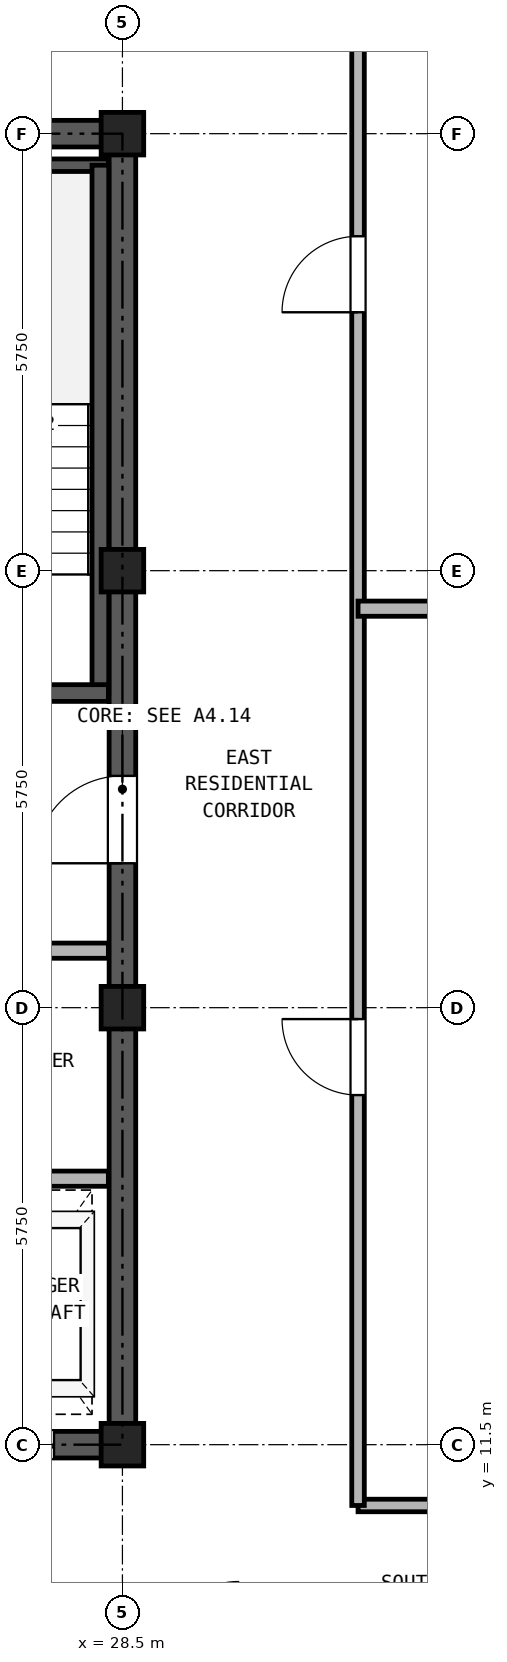
"""IFC4 building model, lengths in metres.
Left out: names, types, materials, properties, quantities, classifications, styles, units other than length and angle.
Written with IfcOpenShell. Run it as: python <this file> out.ifc"""

import sys

from ifc_helpers import new_model, si_unit, direction, frame, frame_2d, origin, origin_2d, place, context, subcontext, project, spatial, rectangle, hollow_rectangle, extrude, source, transform, mapped, element, fill, save


model = new_model("IFC4")
c1 = context("Model", 3, precision=1e-05, world=origin(), true_north=direction((0.0, 1.0)))
c2 = subcontext(c1, "Body", "Model", "MODEL_VIEW")
j1 = project(units=[si_unit("LENGTHUNIT", "METRE"), si_unit("PLANEANGLEUNIT", "RADIAN")], contexts=[c1])
p1 = place(None, origin())
s1 = spatial("IfcSite", under=j1, at=p1, CompositionType="ELEMENT")
p2 = place(p1, origin())
s2 = spatial("IfcBuilding", under=s1, at=p2, CompositionType="ELEMENT")
p3 = place(p2, frame((0.0, 0.0, 239.3)))
s3 = spatial("IfcBuildingStorey", under=s2, at=p3, CompositionType="ELEMENT", Elevation=239.3)
m1 = source(origin(), c2, "Body", "SweptSolid", [
    extrude(hollow_rectangle(XDim=0.56, YDim=0.56, WallThickness=0.03, at=origin_2d()), origin(), (0.0, 0.0, 1.0), 2.98),
])
for number, where, z_axis, x_axis in (
    (1, (28.5, 11.5, 0.0), (0.0, 0.0, 1.0), (1.0, 0.0, 0.0)),
    (2, (28.5, 17.25, 0.0), (0.0, 0.0, 1.0), (1.0, 0.0, 0.0)),
    (3, (28.5, 23.0, 0.0), (0.0, 0.0, 1.0), (1.0, 0.0, 0.0)),
    (4, (28.5, 28.75, 0.0), (0.0, 0.0, 1.0), (1.0, 0.0, 0.0)),
):
    element("IfcColumn", number, at=place(p3, frame(where, z_axis=z_axis, x_axis=x_axis)), inside=s3, PredefinedType="COLUMN", context=c2, shape_type="MappedRepresentation", body=[
        mapped(m1, transform((0.0, 0.0, 0.0), x_axis=(1.0, 0.0, 0.0), y_axis=(0.0, 1.0, 0.0), z_axis=(0.0, 0.0, 1.0), scale=1.0)),
    ])
p4 = place(p3, frame((18.325, 11.5, 0.0), z_axis=(0.0, 0.0, 1.0), x_axis=(1.0, 0.0, 0.0)))
e5 = element("IfcWall", 5, at=p4, inside=s3, PredefinedType="SHEAR", context=c2, shape_type="SweptSolid", body=[
    extrude(rectangle(XDim=10.35, YDim=0.35, at=frame_2d((5.175, 0.0))), origin(), (0.0, 0.0, 1.0), 2.98),
])
p5 = place(p4, frame((1.775, 0.0, 0.0)))
e6 = element("IfcOpeningElement", 6, at=p5, cuts=e5, PredefinedType="OPENING", context=c2, shape_type="SweptSolid", body=[
    extrude(rectangle(XDim=0.95, YDim=2.15, at=frame_2d((0.475, 1.075))), frame((0.0, 0.185, 0.0), z_axis=(0.0, -1.0, 0.0), x_axis=(1.0, 0.0, 0.0)), (0.0, 0.0, 1.0), 0.37),
])
p6 = place(p4, frame((5.275, 0.0, 0.0)))
e7 = element("IfcOpeningElement", 7, at=p6, cuts=e5, PredefinedType="OPENING", context=c2, shape_type="SweptSolid", body=[
    extrude(rectangle(XDim=0.95, YDim=2.15, at=frame_2d((0.475, 1.075))), frame((0.0, 0.185, 0.0), z_axis=(0.0, -1.0, 0.0), x_axis=(1.0, 0.0, 0.0)), (0.0, 0.0, 1.0), 0.37),
])
p7 = place(p4, frame((8.175, 0.0, 0.0)))
e8 = element("IfcOpeningElement", 8, at=p7, cuts=e5, PredefinedType="OPENING", context=c2, shape_type="SweptSolid", body=[
    extrude(rectangle(XDim=1.1, YDim=2.25, at=frame_2d((0.55, 1.125))), frame((0.0, 0.185, 0.0), z_axis=(0.0, -1.0, 0.0), x_axis=(1.0, 0.0, 0.0)), (0.0, 0.0, 1.0), 0.37),
])
p8 = place(p3, frame((18.325, 28.75, 0.0), z_axis=(0.0, 0.0, 1.0), x_axis=(1.0, 0.0, 0.0)))
e9 = element("IfcWall", 9, at=p8, inside=s3, PredefinedType="SHEAR", context=c2, shape_type="SweptSolid", body=[
    extrude(rectangle(XDim=10.35, YDim=0.35, at=frame_2d((5.175, 0.0))), origin(), (0.0, 0.0, 1.0), 2.98),
])
p9 = place(p8, frame((4.055, 0.0, 0.0)))
e10 = element("IfcOpeningElement", 10, at=p9, cuts=e9, PredefinedType="OPENING", context=c2, shape_type="SweptSolid", body=[
    extrude(rectangle(XDim=0.9, YDim=2.05, at=frame_2d((0.45, 1.025))), frame((0.0, 0.185, 0.0), z_axis=(0.0, -1.0, 0.0), x_axis=(1.0, 0.0, 0.0)), (0.0, 0.0, 1.0), 0.37),
])
p10 = place(p8, frame((5.595, 0.0, 0.0)))
e11 = element("IfcOpeningElement", 11, at=p10, cuts=e9, PredefinedType="OPENING", context=c2, shape_type="SweptSolid", body=[
    extrude(rectangle(XDim=0.9, YDim=2.05, at=frame_2d((0.45, 1.025))), frame((0.0, 0.185, 0.0), z_axis=(0.0, -1.0, 0.0), x_axis=(1.0, 0.0, 0.0)), (0.0, 0.0, 1.0), 0.37),
])
p11 = place(p3, frame((28.5, 11.675, 0.0), z_axis=(0.0, 0.0, 1.0), x_axis=(0.0, 1.0, 0.0)))
e12 = element("IfcWall", 12, at=p11, inside=s3, PredefinedType="SHEAR", context=c2, shape_type="SweptSolid", body=[
    extrude(rectangle(XDim=16.9, YDim=0.35, at=frame_2d((8.45, 0.0))), origin(), (0.0, 0.0, 1.0), 2.98),
])
p12 = place(p11, frame((7.475, 0.0, 0.0)))
e13 = element("IfcOpeningElement", 13, at=p12, cuts=e12, PredefinedType="OPENING", context=c2, shape_type="SweptSolid", body=[
    extrude(rectangle(XDim=1.15, YDim=2.2, at=frame_2d((0.575, 1.1))), frame((0.0, 0.185, 0.0), z_axis=(0.0, -1.0, 0.0), x_axis=(1.0, 0.0, 0.0)), (0.0, 0.0, 1.0), 0.37),
])
p13 = place(p3, frame((25.13, 28.335, 0.0), z_axis=(0.0, 0.0, 1.0), x_axis=(1.0, 0.0, 0.0)))
e14 = element("IfcWall", 14, at=p13, inside=s3, PredefinedType="PARTITIONING", context=c2, shape_type="SweptSolid", body=[
    extrude(rectangle(XDim=3.185, YDim=0.165, at=frame_2d((1.593, 0.0))), origin(), (0.0, 0.0, 1.0), 2.98),
])
p14 = place(p3, frame((28.21, 21.39, 0.0), z_axis=(0.0, 0.0, 1.0), x_axis=(0.0, 1.0, 0.0)))
e15 = element("IfcWall", 15, at=p14, inside=s3, PredefinedType="SOLIDWALL", context=c2, shape_type="SweptSolid", body=[
    extrude(rectangle(XDim=6.945, YDim=0.22, at=frame_2d((3.473, 0.0))), origin(), (0.0, 0.0, 1.0), 2.98),
])
p15 = place(p3, frame((25.13, 21.39, 0.0), z_axis=(0.0, 0.0, 1.0), x_axis=(1.0, 0.0, 0.0)))
e16 = element("IfcWall", 16, at=p15, inside=s3, PredefinedType="SOLIDWALL", context=c2, shape_type="SweptSolid", body=[
    extrude(rectangle(XDim=3.185, YDim=0.22, at=frame_2d((1.593, 0.0))), origin(), (0.0, 0.0, 1.0), 2.98),
])
p16 = place(p15, frame((0.92, 0.0, 0.0)))
e17 = element("IfcOpeningElement", 17, at=p16, cuts=e16, PredefinedType="OPENING", context=c2, shape_type="SweptSolid", body=[
    extrude(rectangle(XDim=1.15, YDim=2.2, at=frame_2d((0.575, 1.1))), frame((0.0, 0.12, 0.0), z_axis=(0.0, -1.0, 0.0), x_axis=(1.0, 0.0, 0.0)), (0.0, 0.0, 1.0), 0.24),
])
p17 = place(p3, frame((18.685, 18.0, 0.0), z_axis=(0.0, 0.0, 1.0), x_axis=(1.0, 0.0, 0.0)))
e18 = element("IfcWall", 18, at=p17, inside=s3, PredefinedType="PARTITIONING", context=c2, shape_type="SweptSolid", body=[
    extrude(rectangle(XDim=9.63, YDim=0.2, at=frame_2d((4.815, 0.0))), origin(), (0.0, 0.0, 1.0), 2.98),
])
p18 = place(p17, frame((0.565, 0.0, 0.0)))
e19 = element("IfcOpeningElement", 19, at=p18, cuts=e18, PredefinedType="OPENING", context=c2, shape_type="SweptSolid", body=[
    extrude(rectangle(XDim=1.3, YDim=2.3, at=frame_2d((0.65, 1.15))), frame((0.0, 0.11, 0.0), z_axis=(0.0, -1.0, 0.0), x_axis=(1.0, 0.0, 0.0)), (0.0, 0.0, 1.0), 0.22),
])
p19 = place(p17, frame((2.665, 0.0, 0.0)))
e20 = element("IfcOpeningElement", 20, at=p19, cuts=e18, PredefinedType="OPENING", context=c2, shape_type="SweptSolid", body=[
    extrude(rectangle(XDim=1.3, YDim=2.3, at=frame_2d((0.65, 1.15))), frame((0.0, 0.11, 0.0), z_axis=(0.0, -1.0, 0.0), x_axis=(1.0, 0.0, 0.0)), (0.0, 0.0, 1.0), 0.22),
])
p20 = place(p17, frame((5.065, 0.0, 0.0)))
e21 = element("IfcOpeningElement", 21, at=p20, cuts=e18, PredefinedType="OPENING", context=c2, shape_type="SweptSolid", body=[
    extrude(rectangle(XDim=0.9, YDim=2.05, at=frame_2d((0.45, 1.025))), frame((0.0, 0.11, 0.0), z_axis=(0.0, -1.0, 0.0), x_axis=(1.0, 0.0, 0.0)), (0.0, 0.0, 1.0), 0.22),
])
p21 = place(p17, frame((7.765, 0.0, 0.0)))
e22 = element("IfcOpeningElement", 22, at=p21, cuts=e18, PredefinedType="OPENING", context=c2, shape_type="SweptSolid", body=[
    extrude(rectangle(XDim=0.9, YDim=2.05, at=frame_2d((0.45, 1.025))), frame((0.0, 0.11, 0.0), z_axis=(0.0, -1.0, 0.0), x_axis=(1.0, 0.0, 0.0)), (0.0, 0.0, 1.0), 0.22),
])
p22 = place(p3, frame((18.685, 15.0, 0.0), z_axis=(0.0, 0.0, 1.0), x_axis=(1.0, 0.0, 0.0)))
e23 = element("IfcWall", 23, at=p22, inside=s3, PredefinedType="PARTITIONING", context=c2, shape_type="SweptSolid", body=[
    extrude(rectangle(XDim=9.63, YDim=0.2, at=frame_2d((4.815, 0.0))), origin(), (0.0, 0.0, 1.0), 2.98),
])
p23 = place(p3, frame((31.6, 10.7, 0.0), z_axis=(0.0, 0.0, 1.0), x_axis=(1.0, 0.0, 0.0)))
e24 = element("IfcWall", 24, at=p23, inside=s3, PredefinedType="PARTITIONING", context=c2, shape_type="SweptSolid", body=[
    extrude(rectangle(XDim=6.6, YDim=0.165, at=frame_2d((3.3, 0.0))), origin(), (0.0, 0.0, 1.0), 2.98),
])
p24 = place(p3, frame((31.6, 10.7, 0.0), z_axis=(0.0, 0.0, 1.0), x_axis=(0.0, 1.0, 0.0)))
e25 = element("IfcWall", 25, at=p24, inside=s3, PredefinedType="PARTITIONING", context=c2, shape_type="SweptSolid", body=[
    extrude(rectangle(XDim=24.44, YDim=0.165, at=frame_2d((12.22, 0.0))), origin(), (0.0, 0.0, 1.0), 2.98),
])
p25 = place(p24, frame((5.4, 0.0, 0.0)))
e26 = element("IfcOpeningElement", 26, at=p25, cuts=e25, PredefinedType="OPENING", context=c2, shape_type="SweptSolid", body=[
    extrude(rectangle(XDim=1.0, YDim=2.15, at=frame_2d((0.5, 1.075))), frame((0.0, 0.093, 0.0), z_axis=(0.0, -1.0, 0.0), x_axis=(1.0, 0.0, 0.0)), (0.0, 0.0, 1.0), 0.185),
])
p26 = place(p24, frame((15.7, 0.0, 0.0)))
e27 = element("IfcOpeningElement", 27, at=p26, cuts=e25, PredefinedType="OPENING", context=c2, shape_type="SweptSolid", body=[
    extrude(rectangle(XDim=1.0, YDim=2.15, at=frame_2d((0.5, 1.075))), frame((0.0, 0.093, 0.0), z_axis=(0.0, -1.0, 0.0), x_axis=(1.0, 0.0, 0.0)), (0.0, 0.0, 1.0), 0.185),
])
p27 = place(p3, frame((31.6, 22.5, 0.0), z_axis=(0.0, 0.0, 1.0), x_axis=(1.0, 0.0, 0.0)))
e28 = element("IfcWall", 28, at=p27, inside=s3, PredefinedType="PARTITIONING", context=c2, shape_type="SweptSolid", body=[
    extrude(rectangle(XDim=10.04, YDim=0.2, at=frame_2d((5.02, 0.0))), origin(), (0.0, 0.0, 1.0), 2.98),
])
p28 = place(p12, origin())
e29 = element("IfcDoor", 29, at=p28, inside=s3, OperationType="SINGLE_SWING_LEFT", PredefinedType="DOOR", context=c2, shape_type="SweptSolid", body=[
    extrude(rectangle(XDim=1.15, YDim=2.2, at=frame_2d((0.575, 1.1))), frame((0.0, 0.025, 0.0), z_axis=(0.0, -1.0, 0.0), x_axis=(1.0, 0.0, 0.0)), (0.0, 0.0, 1.0), 0.05),
])
fill(e13, e29)
p29 = place(p7, frame((1.1, 0.0, 0.0), z_axis=(0.0, 0.0, 1.0), x_axis=(-1.0, 0.0, 0.0)))
e30 = element("IfcDoor", 30, at=p29, inside=s3, OperationType="DOUBLE_DOOR_SLIDING", PredefinedType="DOOR", context=c2, shape_type="SweptSolid", body=[
    extrude(rectangle(XDim=1.1, YDim=2.25, at=frame_2d((0.55, 1.125))), frame((0.0, 0.025, 0.0), z_axis=(0.0, -1.0, 0.0), x_axis=(1.0, 0.0, 0.0)), (0.0, 0.0, 1.0), 0.05),
])
fill(e8, e30)
p30 = place(p25, frame((1.0, 0.0, 0.0), z_axis=(0.0, 0.0, 1.0), x_axis=(-1.0, 0.0, 0.0)))
e31 = element("IfcDoor", 31, at=p30, inside=s3, OperationType="SINGLE_SWING_RIGHT", PredefinedType="DOOR", context=c2, shape_type="SweptSolid", body=[
    extrude(rectangle(XDim=1.0, YDim=2.15, at=frame_2d((0.5, 1.075))), frame((0.0, 0.025, 0.0), z_axis=(0.0, -1.0, 0.0), x_axis=(1.0, 0.0, 0.0)), (0.0, 0.0, 1.0), 0.05),
])
fill(e26, e31)
p31 = place(p26, frame((1.0, 0.0, 0.0), z_axis=(0.0, 0.0, 1.0), x_axis=(-1.0, 0.0, 0.0)))
e32 = element("IfcDoor", 32, at=p31, inside=s3, OperationType="SINGLE_SWING_LEFT", PredefinedType="DOOR", context=c2, shape_type="SweptSolid", body=[
    extrude(rectangle(XDim=1.0, YDim=2.15, at=frame_2d((0.5, 1.075))), frame((0.0, 0.025, 0.0), z_axis=(0.0, -1.0, 0.0), x_axis=(1.0, 0.0, 0.0)), (0.0, 0.0, 1.0), 0.05),
])
fill(e27, e32)
save(model, sys.argv[1])
